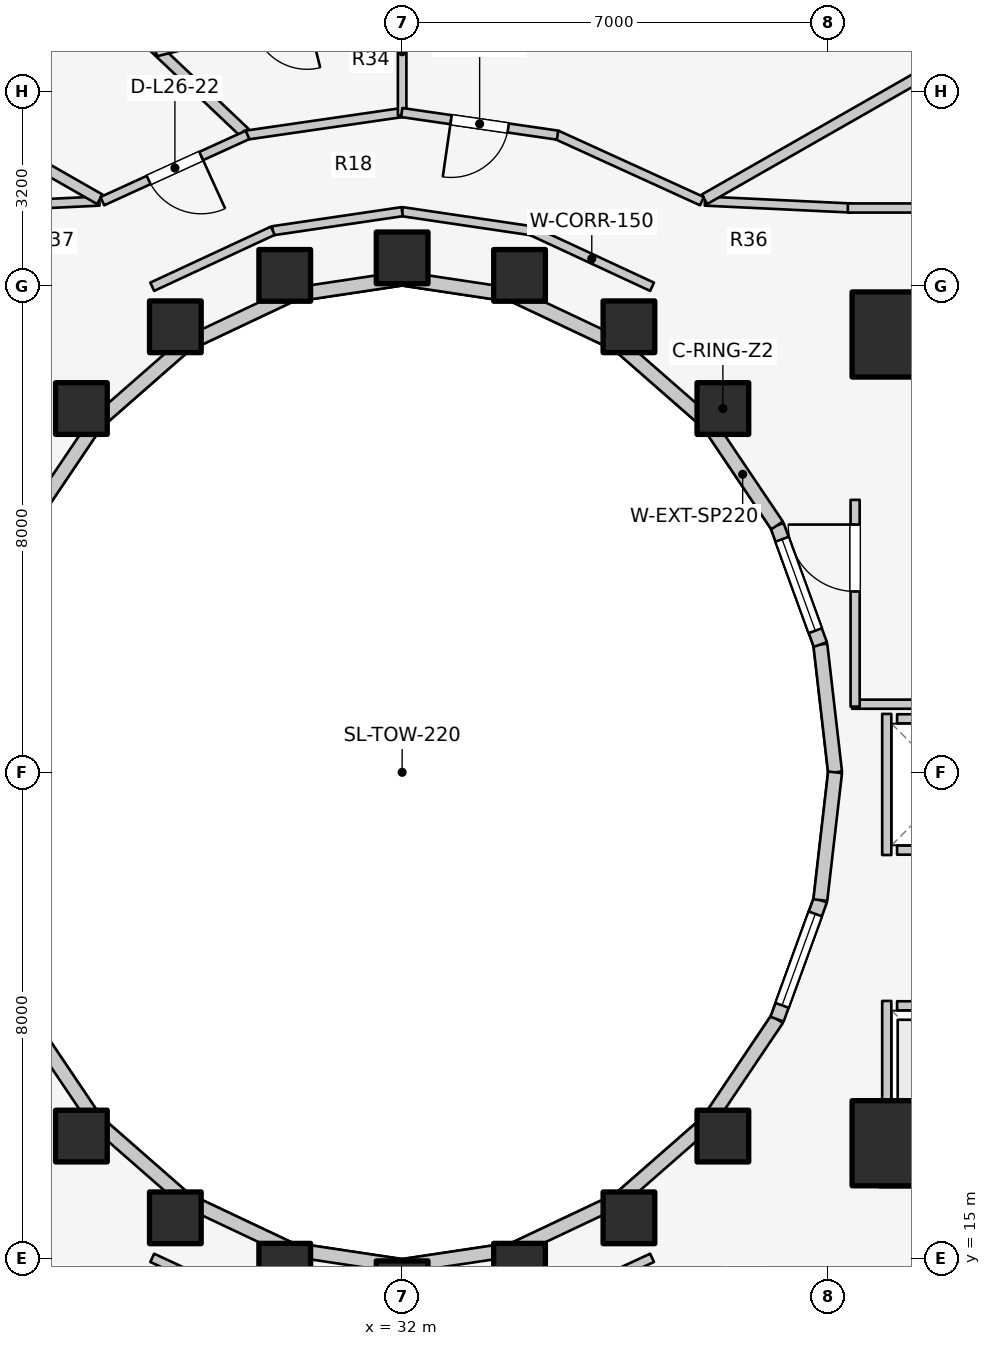
"""IFC4 building model, lengths in metres.
Left out: names, types, materials, properties, quantities, classifications, styles, units other than length and angle.
Written with IfcOpenShell. Run it as: python <this file> out.ifc"""

import sys

from ifc_helpers import new_model, si_unit, direction, frame, frame_2d, origin, origin_2d, place, context, subcontext, project, spatial, rectangle, extrude, element, fill, save


model = new_model("IFC4")
c1 = context("Model", 3, precision=1e-05, world=origin(), true_north=direction((0.0, 1.0)))
c2 = subcontext(c1, "Body", "Model", "MODEL_VIEW")
j1 = project(units=[si_unit("LENGTHUNIT", "METRE"), si_unit("PLANEANGLEUNIT", "RADIAN")], contexts=[c1])
p1 = place(None, origin())
s1 = spatial("IfcSite", under=j1, at=p1, CompositionType="ELEMENT")
p2 = place(p1, origin())
s2 = spatial("IfcBuilding", under=s1, at=p2, CompositionType="ELEMENT")
p3 = place(p2, frame((0.0, 0.0, 88.7)))
s3 = spatial("IfcBuildingStorey", under=s2, at=p3, CompositionType="ELEMENT", Elevation=88.7)
for number, where, z_axis, x_axis in (
    (1, (39.85, 16.55, 0.0), (0.0, 0.0, 1.0), (1.0, 0.0, 0.0)),
    (2, (39.85, 30.35, 0.0), (0.0, 0.0, 1.0), (1.0, 0.0, 0.0)),
):
    element("IfcWall", number, at=place(p3, frame(where, z_axis=z_axis, x_axis=x_axis)), inside=s3, PredefinedType="SHEAR", context=c2, shape_type="SweptSolid", body=[
        extrude(rectangle(XDim=4.5, YDim=0.7, at=frame_2d((2.25, 0.0))), origin(), (0.0, 0.0, 1.0), 3.1),
    ])
for number, where, z_axis, x_axis in (
    (3, (40.1, 16.9, 0.0), (0.0, 0.0, 1.0), (1.0, 0.0, 0.0)),
    (4, (40.1, 30.2, 0.0), (0.0, 0.0, 1.0), (1.0, 0.0, 0.0)),
):
    element("IfcColumn", number, at=place(p3, frame(where, z_axis=z_axis, x_axis=x_axis)), inside=s3, PredefinedType="COLUMN", context=c2, shape_type="SweptSolid", body=[
        extrude(rectangle(XDim=1.4, YDim=1.4, at=origin_2d()), origin(), (0.0, 0.0, 1.0), 3.1),
    ])
for number, where, z_axis, x_axis in (
    (5, (37.275, 28.982, 0.0), (0.0, 0.0, 1.0), (1.0, 0.0, 0.0)),
    (6, (35.73, 30.327, 0.0), (0.0, 0.0, 1.0), (1.0, 0.0, 0.0)),
    (7, (33.931, 31.172, 0.0), (0.0, 0.0, 1.0), (1.0, 0.0, 0.0)),
    (8, (32.0, 31.46, 0.0), (0.0, 0.0, 1.0), (1.0, 0.0, 0.0)),
    (9, (30.069, 31.172, 0.0), (0.0, 0.0, 1.0), (1.0, 0.0, 0.0)),
    (10, (28.27, 30.327, 0.0), (0.0, 0.0, 1.0), (1.0, 0.0, 0.0)),
    (11, (26.725, 28.982, 0.0), (0.0, 0.0, 1.0), (1.0, 0.0, 0.0)),
    (12, (26.725, 17.018, 0.0), (0.0, 0.0, 1.0), (1.0, 0.0, 0.0)),
    (13, (28.27, 15.673, 0.0), (0.0, 0.0, 1.0), (1.0, 0.0, 0.0)),
    (14, (30.069, 14.828, 0.0), (0.0, 0.0, 1.0), (1.0, 0.0, 0.0)),
    (15, (32.0, 14.54, 0.0), (0.0, 0.0, 1.0), (1.0, 0.0, 0.0)),
    (16, (33.931, 14.828, 0.0), (0.0, 0.0, 1.0), (1.0, 0.0, 0.0)),
    (17, (35.73, 15.673, 0.0), (0.0, 0.0, 1.0), (1.0, 0.0, 0.0)),
    (18, (37.275, 17.018, 0.0), (0.0, 0.0, 1.0), (1.0, 0.0, 0.0)),
):
    element("IfcColumn", number, at=place(p3, frame(where, z_axis=z_axis, x_axis=x_axis)), inside=s3, PredefinedType="COLUMN", context=c2, shape_type="SweptSolid", body=[
        extrude(rectangle(XDim=0.85, YDim=0.85, at=origin_2d()), origin(), (0.0, 0.0, 1.0), 3.1),
    ])
p4 = place(p3, frame((39.12, 23.0, 0.0), z_axis=(0.0, 0.0, 1.0), x_axis=(-0.114711713601, 0.993398823617, 0.0)))
e19 = element("IfcWall", 19, at=p4, inside=s3, PredefinedType="STANDARD", context=c2, shape_type="SweptSolid", body=[
    extrude(rectangle(XDim=2.115, YDim=0.23, at=frame_2d((1.058, 0.0))), origin(), (0.0, 0.0, 1.0), 2.84),
])
p5 = place(p3, frame((38.877, 25.102, 0.0), z_axis=(0.0, 0.0, 1.0), x_axis=(-0.341423187295, 0.93990968033, 0.0)))
e20 = element("IfcWall", 20, at=p5, inside=s3, PredefinedType="STANDARD", context=c2, shape_type="SweptSolid", body=[
    extrude(rectangle(XDim=2.084, YDim=0.23, at=frame_2d((1.042, 0.0))), origin(), (0.0, 0.0, 1.0), 2.84),
])
p6 = place(p5, frame((0.242, 0.0, 0.85)))
e21 = element("IfcOpeningElement", 21, at=p6, cuts=e20, PredefinedType="OPENING", context=c2, shape_type="SweptSolid", body=[
    extrude(rectangle(XDim=1.6, YDim=1.65, at=frame_2d((0.8, 0.825))), frame((0.0, 0.125, 0.0), z_axis=(0.0, -1.0, 0.0), x_axis=(1.0, 0.0, 0.0)), (0.0, 0.0, 1.0), 0.25),
])
p7 = place(p3, frame((38.166, 27.06, 0.0), z_axis=(0.0, 0.0, 1.0), x_axis=(-0.558197800898, 0.829707909492, 0.0)))
e22 = element("IfcWall", 22, at=p7, inside=s3, PredefinedType="STANDARD", context=c2, shape_type="SweptSolid", body=[
    extrude(rectangle(XDim=2.027, YDim=0.23, at=frame_2d((1.013, 0.0))), origin(), (0.0, 0.0, 1.0), 2.16),
])
p8 = place(p3, frame((37.035, 28.742, 0.0), z_axis=(0.0, 0.0, 1.0), x_axis=(-0.752576694707, 0.658504607869, 0.0)))
e23 = element("IfcWall", 23, at=p8, inside=s3, PredefinedType="STANDARD", context=c2, shape_type="SweptSolid", body=[
    extrude(rectangle(XDim=1.959, YDim=0.23, at=frame_2d((0.98, 0.0))), origin(), (0.0, 0.0, 1.0), 2.16),
])
p9 = place(p3, frame((35.56, 30.032, 0.0), z_axis=(0.0, 0.0, 1.0), x_axis=(-0.904179699603, 0.427152280606, 0.0)))
e24 = element("IfcWall", 24, at=p9, inside=s3, PredefinedType="STANDARD", context=c2, shape_type="SweptSolid", body=[
    extrude(rectangle(XDim=1.899, YDim=0.23, at=frame_2d((0.95, 0.0))), origin(), (0.0, 0.0, 1.0), 2.16),
])
for number, where, z_axis, x_axis in (
    (25, (33.843, 30.843, 0.0), (0.0, 0.0, 1.0), (-0.989, 0.149, 0.0)),
    (26, (32.0, 31.12, 0.0), (0.0, 0.0, 1.0), (-0.989, -0.149, 0.0)),
):
    element("IfcWall", number, at=place(p3, frame(where, z_axis=z_axis, x_axis=x_axis)), inside=s3, PredefinedType="STANDARD", context=c2, shape_type="SweptSolid", body=[
        extrude(rectangle(XDim=1.864, YDim=0.23, at=frame_2d((0.932, 0.0))), origin(), (0.0, 0.0, 1.0), 2.16),
    ])
p10 = place(p3, frame((30.157, 30.843, 0.0), z_axis=(0.0, 0.0, 1.0), x_axis=(-0.904179699603, -0.427152280606, 0.0)))
e27 = element("IfcWall", 27, at=p10, inside=s3, PredefinedType="STANDARD", context=c2, shape_type="SweptSolid", body=[
    extrude(rectangle(XDim=1.899, YDim=0.23, at=frame_2d((0.95, 0.0))), origin(), (0.0, 0.0, 1.0), 2.16),
])
p11 = place(p3, frame((28.44, 30.032, 0.0), z_axis=(0.0, 0.0, 1.0), x_axis=(-0.752576694707, -0.658504607869, 0.0)))
e28 = element("IfcWall", 28, at=p11, inside=s3, PredefinedType="STANDARD", context=c2, shape_type="SweptSolid", body=[
    extrude(rectangle(XDim=1.959, YDim=0.23, at=frame_2d((0.98, 0.0))), origin(), (0.0, 0.0, 1.0), 2.16),
])
for number, where, z_axis, x_axis in (
    (29, (26.965, 28.742, 0.0), (0.0, 0.0, 1.0), (-0.558, -0.83, 0.0)),
    (30, (25.834, 18.94, 0.0), (0.0, 0.0, 1.0), (0.558, -0.83, 0.0)),
):
    element("IfcWall", number, at=place(p3, frame(where, z_axis=z_axis, x_axis=x_axis)), inside=s3, PredefinedType="STANDARD", context=c2, shape_type="SweptSolid", body=[
        extrude(rectangle(XDim=2.027, YDim=0.23, at=frame_2d((1.013, 0.0))), origin(), (0.0, 0.0, 1.0), 2.16),
    ])
p12 = place(p3, frame((26.965, 17.258, 0.0), z_axis=(0.0, 0.0, 1.0), x_axis=(0.752576694707, -0.658504607869, 0.0)))
e31 = element("IfcWall", 31, at=p12, inside=s3, PredefinedType="STANDARD", context=c2, shape_type="SweptSolid", body=[
    extrude(rectangle(XDim=1.959, YDim=0.23, at=frame_2d((0.98, 0.0))), origin(), (0.0, 0.0, 1.0), 2.16),
])
p13 = place(p3, frame((28.44, 15.968, 0.0), z_axis=(0.0, 0.0, 1.0), x_axis=(0.904179699603, -0.427152280606, 0.0)))
e32 = element("IfcWall", 32, at=p13, inside=s3, PredefinedType="STANDARD", context=c2, shape_type="SweptSolid", body=[
    extrude(rectangle(XDim=1.899, YDim=0.23, at=frame_2d((0.95, 0.0))), origin(), (0.0, 0.0, 1.0), 2.16),
])
for number, where, z_axis, x_axis in (
    (33, (30.157, 15.157, 0.0), (0.0, 0.0, 1.0), (0.989, -0.149, 0.0)),
    (34, (32.0, 14.88, 0.0), (0.0, 0.0, 1.0), (0.989, 0.149, 0.0)),
):
    element("IfcWall", number, at=place(p3, frame(where, z_axis=z_axis, x_axis=x_axis)), inside=s3, PredefinedType="STANDARD", context=c2, shape_type="SweptSolid", body=[
        extrude(rectangle(XDim=1.864, YDim=0.23, at=frame_2d((0.932, 0.0))), origin(), (0.0, 0.0, 1.0), 2.16),
    ])
p14 = place(p3, frame((33.843, 15.157, 0.0), z_axis=(0.0, 0.0, 1.0), x_axis=(0.904179699603, 0.427152280606, 0.0)))
e35 = element("IfcWall", 35, at=p14, inside=s3, PredefinedType="STANDARD", context=c2, shape_type="SweptSolid", body=[
    extrude(rectangle(XDim=1.899, YDim=0.23, at=frame_2d((0.95, 0.0))), origin(), (0.0, 0.0, 1.0), 2.16),
])
p15 = place(p3, frame((35.56, 15.968, 0.0), z_axis=(0.0, 0.0, 1.0), x_axis=(0.752576694707, 0.658504607869, 0.0)))
e36 = element("IfcWall", 36, at=p15, inside=s3, PredefinedType="STANDARD", context=c2, shape_type="SweptSolid", body=[
    extrude(rectangle(XDim=1.959, YDim=0.23, at=frame_2d((0.98, 0.0))), origin(), (0.0, 0.0, 1.0), 2.16),
])
p16 = place(p3, frame((37.035, 17.258, 0.0), z_axis=(0.0, 0.0, 1.0), x_axis=(0.558197800898, 0.829707909492, 0.0)))
e37 = element("IfcWall", 37, at=p16, inside=s3, PredefinedType="STANDARD", context=c2, shape_type="SweptSolid", body=[
    extrude(rectangle(XDim=2.027, YDim=0.23, at=frame_2d((1.013, 0.0))), origin(), (0.0, 0.0, 1.0), 2.16),
])
p17 = place(p3, frame((38.166, 18.94, 0.0), z_axis=(0.0, 0.0, 1.0), x_axis=(0.341423187295, 0.93990968033, 0.0)))
e38 = element("IfcWall", 38, at=p17, inside=s3, PredefinedType="STANDARD", context=c2, shape_type="SweptSolid", body=[
    extrude(rectangle(XDim=2.084, YDim=0.23, at=frame_2d((1.042, 0.0))), origin(), (0.0, 0.0, 1.0), 2.84),
])
p18 = place(p17, frame((0.242, 0.0, 0.85)))
e39 = element("IfcOpeningElement", 39, at=p18, cuts=e38, PredefinedType="OPENING", context=c2, shape_type="SweptSolid", body=[
    extrude(rectangle(XDim=1.6, YDim=1.65, at=frame_2d((0.8, 0.825))), frame((0.0, 0.125, 0.0), z_axis=(0.0, -1.0, 0.0), x_axis=(1.0, 0.0, 0.0)), (0.0, 0.0, 1.0), 0.25),
])
p19 = place(p3, frame((38.877, 20.898, 0.0), z_axis=(0.0, 0.0, 1.0), x_axis=(0.114711713601, 0.993398823617, 0.0)))
e40 = element("IfcWall", 40, at=p19, inside=s3, PredefinedType="STANDARD", context=c2, shape_type="SweptSolid", body=[
    extrude(rectangle(XDim=2.115, YDim=0.23, at=frame_2d((1.058, 0.0))), origin(), (0.0, 0.0, 1.0), 2.84),
])
p20 = place(p3, frame((40.14, 19.16, 0.0), z_axis=(0.0, 0.0, 1.0), x_axis=(1.0, 0.0, 0.0)))
e41 = element("IfcWall", 41, at=p20, inside=s3, PredefinedType="SOLIDWALL", context=c2, shape_type="SweptSolid", body=[
    extrude(rectangle(XDim=1.82, YDim=0.15, at=frame_2d((0.91, 0.0))), origin(), (0.0, 0.0, 1.0), 2.12),
])
p21 = place(p20, frame((0.36, 0.0, 0.0)))
e42 = element("IfcOpeningElement", 42, at=p21, cuts=e41, PredefinedType="OPENING", context=c2, shape_type="SweptSolid", body=[
    extrude(rectangle(XDim=1.1, YDim=2.1, at=frame_2d((0.55, 1.05))), frame((0.0, 0.085, 0.0), z_axis=(0.0, -1.0, 0.0), x_axis=(1.0, 0.0, 0.0)), (0.0, 0.0, 1.0), 0.17),
])
p22 = place(p3, frame((40.14, 17.1, 0.0), z_axis=(0.0, 0.0, 1.0), x_axis=(1.0, 0.0, 0.0)))
e43 = element("IfcWall", 43, at=p22, inside=s3, PredefinedType="SOLIDWALL", context=c2, shape_type="SweptSolid", body=[
    extrude(rectangle(XDim=1.82, YDim=0.15, at=frame_2d((0.91, 0.0))), origin(), (0.0, 0.0, 1.0), 2.12),
])
p23 = place(p3, frame((39.97, 17.02, 0.0), z_axis=(0.0, 0.0, 1.0), x_axis=(0.0, 1.0, 0.0)))
e44 = element("IfcWall", 44, at=p23, inside=s3, PredefinedType="SOLIDWALL", context=c2, shape_type="SweptSolid", body=[
    extrude(rectangle(XDim=2.22, YDim=0.15, at=frame_2d((1.11, 0.0))), origin(), (0.0, 0.0, 1.0), 2.12),
])
for number, where, z_axis, x_axis in (
    (45, (40.14, 21.72, 0.0), (0.0, 0.0, 1.0), (1.0, 0.0, 0.0)),
    (46, (40.14, 23.88, 0.0), (0.0, 0.0, 1.0), (1.0, 0.0, 0.0)),
):
    element("IfcWall", number, at=place(p3, frame(where, z_axis=z_axis, x_axis=x_axis)), inside=s3, PredefinedType="SOLIDWALL", context=c2, shape_type="SweptSolid", body=[
        extrude(rectangle(XDim=1.82, YDim=0.15, at=frame_2d((0.91, 0.0))), origin(), (0.0, 0.0, 1.0), 2.12),
    ])
p24 = place(p3, frame((39.97, 21.64, 0.0), z_axis=(0.0, 0.0, 1.0), x_axis=(0.0, 1.0, 0.0)))
e47 = element("IfcWall", 47, at=p24, inside=s3, PredefinedType="SOLIDWALL", context=c2, shape_type="SweptSolid", body=[
    extrude(rectangle(XDim=2.32, YDim=0.15, at=frame_2d((1.16, 0.0))), origin(), (0.0, 0.0, 1.0), 2.12),
])
p25 = place(p3, frame((39.4, 24.12, 0.0), z_axis=(0.0, 0.0, 1.0), x_axis=(1.0, 0.0, 0.0)))
e48 = element("IfcWall", 48, at=p25, inside=s3, PredefinedType="PARTITIONING", context=c2, shape_type="SweptSolid", body=[
    extrude(rectangle(XDim=5.08, YDim=0.15, at=frame_2d((2.54, 0.0))), origin(), (0.0, 0.0, 1.0), 2.12),
])
p26 = place(p3, frame((39.45, 24.08, 0.0), z_axis=(0.0, 0.0, 1.0), x_axis=(0.0, 1.0, 0.0)))
e49 = element("IfcWall", 49, at=p26, inside=s3, PredefinedType="PARTITIONING", context=c2, shape_type="SweptSolid", body=[
    extrude(rectangle(XDim=3.4, YDim=0.15, at=frame_2d((1.7, 0.0))), origin(), (0.0, 0.0, 1.0), 2.855),
])
p27 = place(p26, frame((1.894, 0.0, 0.0)))
e50 = element("IfcOpeningElement", 50, at=p27, cuts=e49, PredefinedType="OPENING", context=c2, shape_type="SweptSolid", body=[
    extrude(rectangle(XDim=1.1, YDim=2.1, at=frame_2d((0.55, 1.05))), frame((0.0, 0.085, 0.0), z_axis=(0.0, -1.0, 0.0), x_axis=(1.0, 0.0, 0.0)), (0.0, 0.0, 1.0), 0.17),
])
p28 = place(p3, frame((36.11, 30.985, 0.0), z_axis=(0.0, 0.0, 1.0), x_axis=(-0.906943449489, 0.421252393975, 0.0)))
e51 = element("IfcWall", 51, at=p28, inside=s3, PredefinedType="PARTITIONING", context=c2, shape_type="SweptSolid", body=[
    extrude(rectangle(XDim=2.186, YDim=0.15, at=frame_2d((1.093, 0.0))), origin(), (0.0, 0.0, 1.0), 2.272),
])
for number, where, z_axis, x_axis in (
    (52, (34.127, 31.906, 0.0), (0.0, 0.0, 1.0), (-0.989, 0.146, 0.0)),
    (53, (32.0, 32.22, 0.0), (0.0, 0.0, 1.0), (-0.989, -0.146, 0.0)),
):
    element("IfcWall", number, at=place(p3, frame(where, z_axis=z_axis, x_axis=x_axis)), inside=s3, PredefinedType="PARTITIONING", context=c2, shape_type="SweptSolid", body=[
        extrude(rectangle(XDim=2.151, YDim=0.15, at=frame_2d((1.075, 0.0))), origin(), (0.0, 0.0, 1.0), 2.272),
    ])
for number, where, z_axis, x_axis in (
    (54, (29.873, 31.906, 0.0), (0.0, 0.0, 1.0), (-0.907, -0.421, 0.0)),
    (55, (27.89, 15.015, 0.0), (0.0, 0.0, 1.0), (0.907, -0.421, 0.0)),
    (56, (34.127, 14.094, 0.0), (0.0, 0.0, 1.0), (0.907, 0.421, 0.0)),
):
    element("IfcWall", number, at=place(p3, frame(where, z_axis=z_axis, x_axis=x_axis)), inside=s3, PredefinedType="PARTITIONING", context=c2, shape_type="SweptSolid", body=[
        extrude(rectangle(XDim=2.186, YDim=0.15, at=frame_2d((1.093, 0.0))), origin(), (0.0, 0.0, 1.0), 2.272),
    ])
p29 = place(p3, frame((36.98, 32.394, 0.0), z_axis=(0.0, 0.0, 1.0), x_axis=(0.998877427952, -0.047369651964, 0.0)))
e57 = element("IfcWall", 57, at=p29, inside=s3, PredefinedType="PARTITIONING", context=c2, shape_type="SweptSolid", body=[
    extrude(rectangle(XDim=2.433, YDim=0.15, at=frame_2d((1.216, 0.0))), origin(), (0.0, 0.0, 1.0), 2.272),
])
p30 = place(p3, frame((39.33, 32.28, 0.0), z_axis=(0.0, 0.0, 1.0), x_axis=(1.0, 0.0, 0.0)))
e58 = element("IfcWall", 58, at=p30, inside=s3, PredefinedType="PARTITIONING", context=c2, shape_type="SweptSolid", body=[
    extrude(rectangle(XDim=7.52, YDim=0.15, at=frame_2d((3.76, 0.0))), origin(), (0.0, 0.0, 1.0), 2.272),
])
p31 = place(p30, frame((5.22, 0.0, 0.0)))
e59 = element("IfcOpeningElement", 59, at=p31, cuts=e58, PredefinedType="OPENING", context=c2, shape_type="SweptSolid", body=[
    extrude(rectangle(XDim=0.9, YDim=2.1, at=frame_2d((0.45, 1.05))), frame((0.0, 0.085, 0.0), z_axis=(0.0, -1.0, 0.0), x_axis=(1.0, 0.0, 0.0)), (0.0, 0.0, 1.0), 0.17),
])
p32 = place(p3, frame((27.02, 32.394, 0.0), z_axis=(0.0, 0.0, 1.0), x_axis=(-0.998877427952, -0.047369651964, 0.0)))
e60 = element("IfcWall", 60, at=p32, inside=s3, PredefinedType="PARTITIONING", context=c2, shape_type="SweptSolid", body=[
    extrude(rectangle(XDim=2.433, YDim=0.15, at=frame_2d((1.216, 0.0))), origin(), (0.0, 0.0, 1.0), 2.272),
])
p33 = place(p3, frame((36.973, 32.424, 0.0), z_axis=(0.0, 0.0, 1.0), x_axis=(0.868484076301, 0.495717065685, 0.0)))
e61 = element("IfcWall", 61, at=p33, inside=s3, PredefinedType="PARTITIONING", context=c2, shape_type="SweptSolid", body=[
    extrude(rectangle(XDim=8.789, YDim=0.18, at=frame_2d((4.394, 0.0))), origin(), (0.0, 0.0, 1.0), 2.272),
])
p34 = place(p3, frame((29.411, 33.518, 0.0), z_axis=(0.0, 0.0, 1.0), x_axis=(-0.726306601605, 0.687370875485, 0.0)))
e62 = element("IfcWall", 62, at=p34, inside=s3, PredefinedType="PARTITIONING", context=c2, shape_type="SweptSolid", body=[
    extrude(rectangle(XDim=6.76, YDim=0.18, at=frame_2d((3.38, 0.0))), origin(), (0.0, 0.0, 1.0), 2.272),
])
p35 = place(p3, frame((27.027, 32.424, 0.0), z_axis=(0.0, 0.0, 1.0), x_axis=(-0.868484076301, 0.495717065685, 0.0)))
e63 = element("IfcWall", 63, at=p35, inside=s3, PredefinedType="PARTITIONING", context=c2, shape_type="SweptSolid", body=[
    extrude(rectangle(XDim=8.789, YDim=0.18, at=frame_2d((4.394, 0.0))), origin(), (0.0, 0.0, 1.0), 2.272),
])
p36 = place(p3, frame((32.05, 33.857, 0.0), z_axis=(0.0, 0.0, 1.0), x_axis=(-0.989649898776, -0.143502884474, 0.0)))
e64 = element("IfcWall", 64, at=p36, inside=s3, PredefinedType="PARTITIONING", context=c2, shape_type="SweptSolid", body=[
    extrude(rectangle(XDim=2.676, YDim=0.15, at=frame_2d((1.338, 0.0))), origin(), (0.0, 0.0, 1.0), 2.272),
])
p37 = place(p3, frame((32.0, 33.8, 0.0), z_axis=(0.0, 0.0, 1.0), x_axis=(0.0, 1.0, 0.0)))
e65 = element("IfcWall", 65, at=p37, inside=s3, PredefinedType="PLUMBINGWALL", context=c2, shape_type="SweptSolid", body=[
    extrude(rectangle(XDim=2.1, YDim=0.14, at=frame_2d((1.05, 0.0))), origin(), (0.0, 0.0, 1.0), 2.272),
])
p38 = place(p3, frame((32.049, 35.862, 0.0), z_axis=(0.0, 0.0, 1.0), x_axis=(-0.970461257599, -0.241257015439, 0.0)))
e66 = element("IfcWall", 66, at=p38, inside=s3, PredefinedType="PLUMBINGWALL", context=c2, shape_type="SweptSolid", body=[
    extrude(rectangle(XDim=4.224, YDim=0.14, at=frame_2d((2.112, 0.0))), origin(), (0.0, 0.0, 1.0), 2.272),
])
p39 = place(p38, frame((1.662, 0.0, 0.0)))
e67 = element("IfcOpeningElement", 67, at=p39, cuts=e66, PredefinedType="OPENING", context=c2, shape_type="SweptSolid", body=[
    extrude(rectangle(XDim=0.9, YDim=2.1, at=frame_2d((0.45, 1.05))), frame((0.0, 0.08, 0.0), z_axis=(0.0, -1.0, 0.0), x_axis=(1.0, 0.0, 0.0)), (0.0, 0.0, 1.0), 0.16),
])
p40 = place(p3, frame((36.931, 32.393, 0.0), z_axis=(0.0, 0.0, 1.0), x_axis=(-0.909747571199, 0.415161843982, 0.0)))
e68 = element("IfcWall", 68, at=p40, inside=s3, PredefinedType="PARTITIONING", context=c2, shape_type="SweptSolid", body=[
    extrude(rectangle(XDim=2.625, YDim=0.15, at=frame_2d((1.312, 0.0))), origin(), (0.0, 0.0, 1.0), 2.272),
])
p41 = place(p3, frame((34.556, 33.478, 0.0), z_axis=(0.0, 0.0, 1.0), x_axis=(-0.989637894688, 0.143585644814, 0.0)))
e69 = element("IfcWall", 69, at=p41, inside=s3, PredefinedType="PARTITIONING", context=c2, shape_type="SweptSolid", body=[
    extrude(rectangle(XDim=2.59, YDim=0.15, at=frame_2d((1.295, 0.0))), origin(), (0.0, 0.0, 1.0), 2.272),
])
p42 = place(p41, frame((0.82, 0.0, 0.0)))
e70 = element("IfcOpeningElement", 70, at=p42, cuts=e69, PredefinedType="OPENING", context=c2, shape_type="SweptSolid", body=[
    extrude(rectangle(XDim=0.95, YDim=2.1, at=frame_2d((0.475, 1.05))), frame((0.0, 0.085, 0.0), z_axis=(0.0, -1.0, 0.0), x_axis=(1.0, 0.0, 0.0)), (0.0, 0.0, 1.0), 0.17),
])
p43 = place(p3, frame((29.457, 33.482, 0.0), z_axis=(0.0, 0.0, 1.0), x_axis=(-0.909747571199, -0.415161843982, 0.0)))
e71 = element("IfcWall", 71, at=p43, inside=s3, PredefinedType="PARTITIONING", context=c2, shape_type="SweptSolid", body=[
    extrude(rectangle(XDim=2.625, YDim=0.15, at=frame_2d((1.312, 0.0))), origin(), (0.0, 0.0, 1.0), 2.272),
])
p44 = place(p43, frame((0.838, 0.0, 0.0)))
e72 = element("IfcOpeningElement", 72, at=p44, cuts=e71, PredefinedType="OPENING", context=c2, shape_type="SweptSolid", body=[
    extrude(rectangle(XDim=0.95, YDim=2.1, at=frame_2d((0.475, 1.05))), frame((0.0, 0.085, 0.0), z_axis=(0.0, -1.0, 0.0), x_axis=(1.0, 0.0, 0.0)), (0.0, 0.0, 1.0), 0.17),
])
p45 = place(p6, origin())
e73 = element("IfcWindow", 73, at=p45, inside=s3, PartitioningType="SINGLE_PANEL", PredefinedType="WINDOW", context=c2, shape_type="SweptSolid", body=[
    extrude(rectangle(XDim=1.6, YDim=1.65, at=frame_2d((0.8, 0.825))), frame((0.0, 0.03, 0.0), z_axis=(0.0, -1.0, 0.0), x_axis=(1.0, 0.0, 0.0)), (0.0, 0.0, 1.0), 0.06),
])
fill(e21, e73)
p46 = place(p18, origin())
e74 = element("IfcWindow", 74, at=p46, inside=s3, PartitioningType="SINGLE_PANEL", PredefinedType="WINDOW", context=c2, shape_type="SweptSolid", body=[
    extrude(rectangle(XDim=1.6, YDim=1.65, at=frame_2d((0.8, 0.825))), frame((0.0, 0.03, 0.0), z_axis=(0.0, -1.0, 0.0), x_axis=(1.0, 0.0, 0.0)), (0.0, 0.0, 1.0), 0.06),
])
fill(e39, e74)
p47 = place(p27, origin())
e75 = element("IfcDoor", 75, at=p47, inside=s3, OperationType="SINGLE_SWING_RIGHT", PredefinedType="DOOR", context=c2, shape_type="SweptSolid", body=[
    extrude(rectangle(XDim=1.1, YDim=2.1, at=frame_2d((0.55, 1.05))), frame((0.0, 0.025, 0.0), z_axis=(0.0, -1.0, 0.0), x_axis=(1.0, 0.0, 0.0)), (0.0, 0.0, 1.0), 0.05),
])
fill(e50, e75)
p48 = place(p42, origin())
e76 = element("IfcDoor", 76, at=p48, inside=s3, OperationType="SINGLE_SWING_RIGHT", PredefinedType="DOOR", context=c2, shape_type="SweptSolid", body=[
    extrude(rectangle(XDim=0.95, YDim=2.1, at=frame_2d((0.475, 1.05))), frame((0.0, 0.025, 0.0), z_axis=(0.0, -1.0, 0.0), x_axis=(1.0, 0.0, 0.0)), (0.0, 0.0, 1.0), 0.05),
])
fill(e70, e76)
p49 = place(p44, origin())
e77 = element("IfcDoor", 77, at=p49, inside=s3, OperationType="SINGLE_SWING_LEFT", PredefinedType="DOOR", context=c2, shape_type="SweptSolid", body=[
    extrude(rectangle(XDim=0.95, YDim=2.1, at=frame_2d((0.475, 1.05))), frame((0.0, 0.025, 0.0), z_axis=(0.0, -1.0, 0.0), x_axis=(1.0, 0.0, 0.0)), (0.0, 0.0, 1.0), 0.05),
])
fill(e72, e77)
save(model, sys.argv[1])
